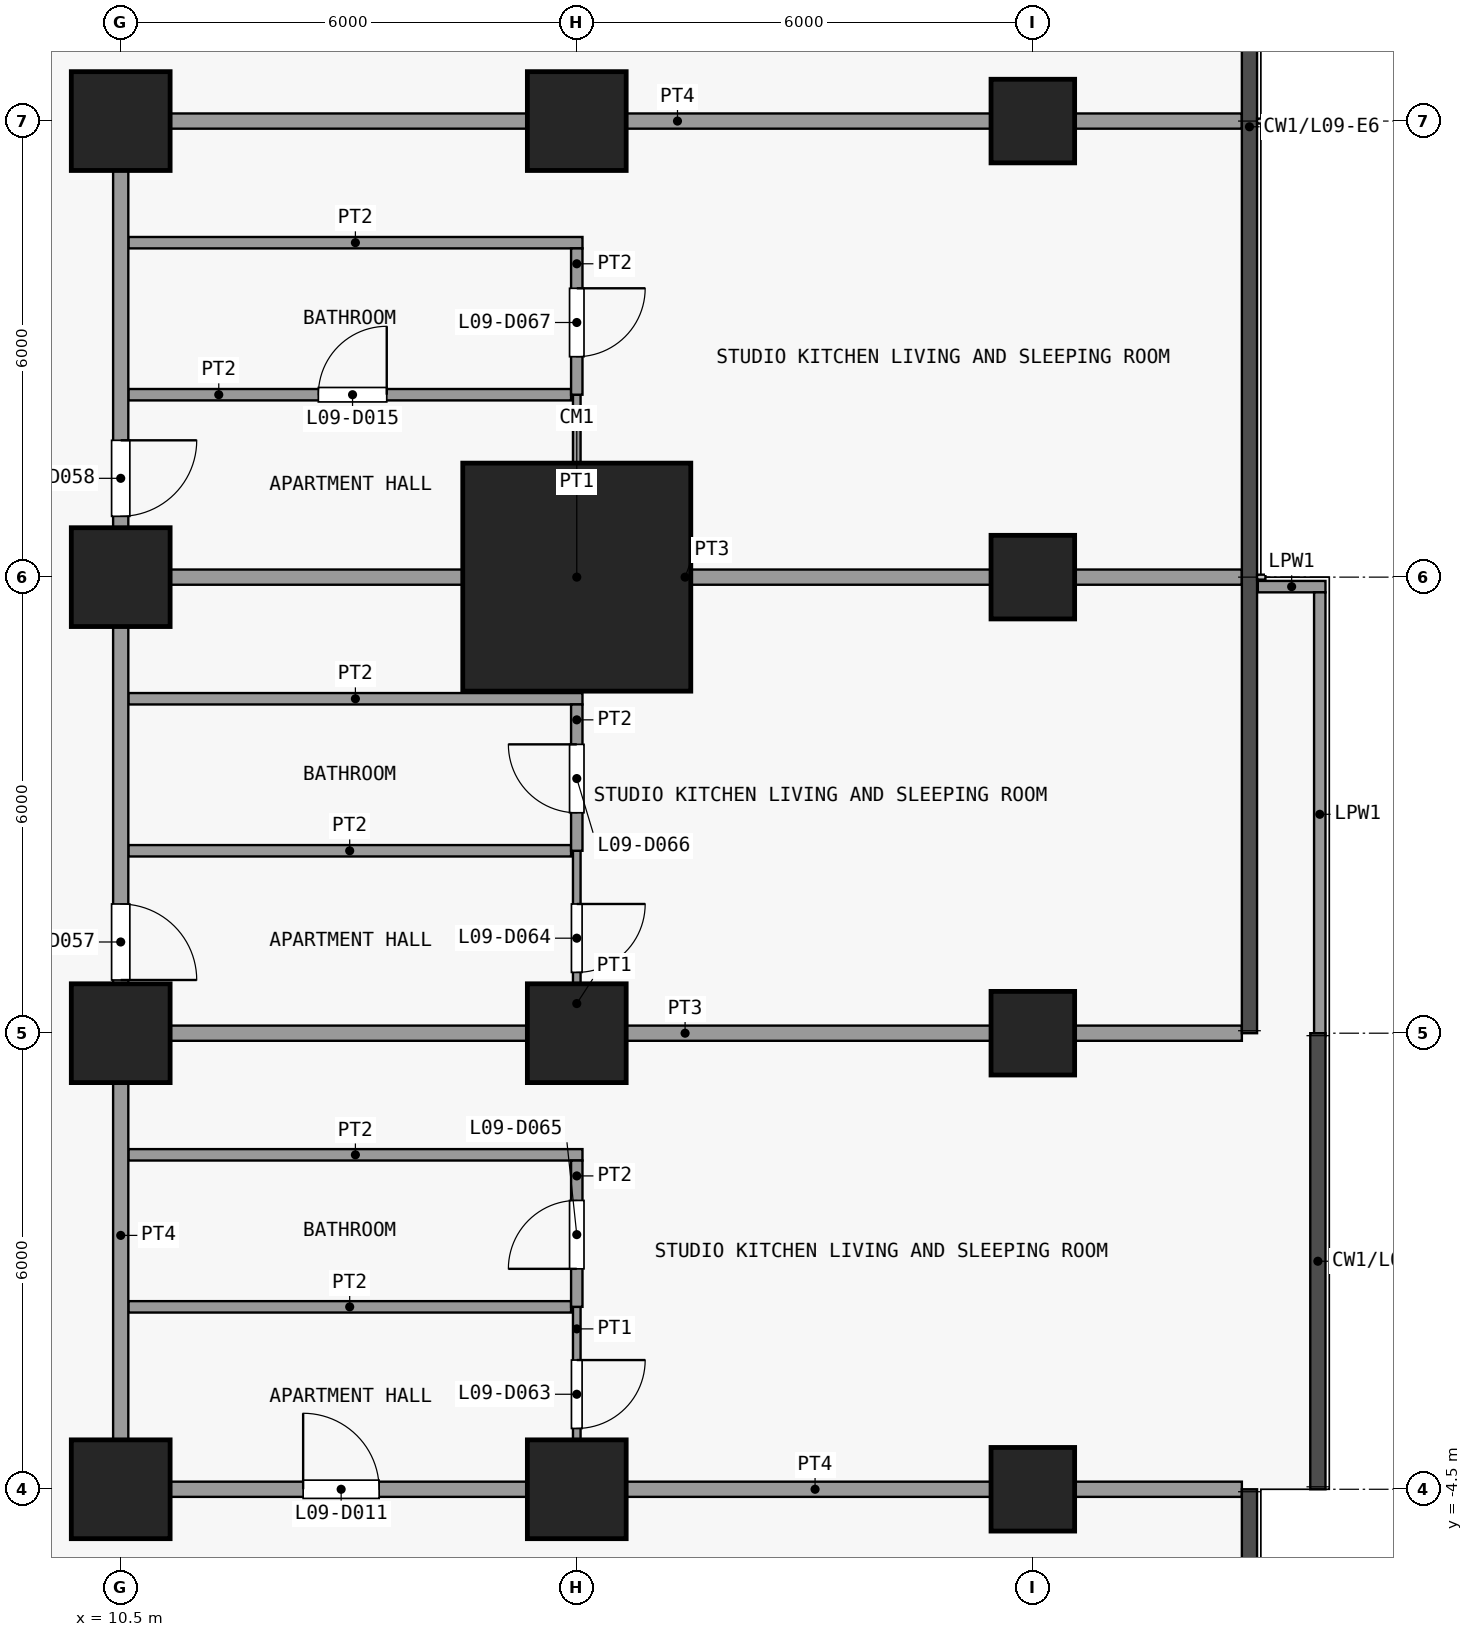
"""IFC4 building model, lengths in metres.
Left out: names, types, materials, properties, quantities, classifications, styles, units other than length and angle.
Written with IfcOpenShell. Run it as: python <this file> out.ifc"""

import sys

from ifc_helpers import new_model, si_unit, direction, frame, frame_2d, origin, origin_2d, place, context, subcontext, project, spatial, rectangle, extrude, element, fill, save


model = new_model("IFC4")
c1 = context("Model", 3, precision=1e-05, world=origin(), true_north=direction((0.0, 1.0)))
c2 = subcontext(c1, "Body", "Model", "MODEL_VIEW")
j1 = project(units=[si_unit("LENGTHUNIT", "METRE"), si_unit("PLANEANGLEUNIT", "RADIAN")], contexts=[c1])
p1 = place(None, origin())
s1 = spatial("IfcSite", under=j1, at=p1, CompositionType="ELEMENT")
p2 = place(p1, origin())
s2 = spatial("IfcBuilding", under=s1, at=p2, CompositionType="ELEMENT")
p3 = place(p2, frame((0.0, 0.0, 43.3)))
s3 = spatial("IfcBuildingStorey", under=s2, at=p3, CompositionType="ELEMENT", Elevation=43.3)
for number, where, z_axis, x_axis in (
    (1, (10.5, -4.5, 0.0), (0.0, 0.0, 1.0), (1.0, 0.0, 0.0)),
    (2, (10.5, 1.5, 0.0), (0.0, 0.0, 1.0), (1.0, 0.0, 0.0)),
    (3, (10.5, 7.5, 0.0), (0.0, 0.0, 1.0), (1.0, 0.0, 0.0)),
    (4, (10.5, 13.5, 0.0), (0.0, 0.0, 1.0), (1.0, 0.0, 0.0)),
    (5, (16.5, -4.5, 0.0), (0.0, 0.0, 1.0), (1.0, 0.0, 0.0)),
    (6, (16.5, 1.5, 0.0), (0.0, 0.0, 1.0), (1.0, 0.0, 0.0)),
):
    element("IfcColumn", number, at=place(p3, frame(where, z_axis=z_axis, x_axis=x_axis)), inside=s3, PredefinedType="COLUMN", context=c2, shape_type="SweptSolid", body=[
        extrude(rectangle(XDim=1.3, YDim=1.3, at=origin_2d()), origin(), (0.0, 0.0, 1.0), 3.6),
    ])
p4 = place(p3, frame((16.5, 7.5, 0.0), z_axis=(0.0, 0.0, 1.0), x_axis=(1.0, 0.0, 0.0)))
e7 = element("IfcColumn", 7, at=p4, inside=s3, PredefinedType="COLUMN", context=c2, shape_type="SweptSolid", body=[
    extrude(rectangle(XDim=3.0, YDim=3.0, at=origin_2d()), origin(), (0.0, 0.0, 1.0), 3.6),
])
p5 = place(p3, frame((16.5, 13.5, 0.0), z_axis=(0.0, 0.0, 1.0), x_axis=(1.0, 0.0, 0.0)))
e8 = element("IfcColumn", 8, at=p5, inside=s3, PredefinedType="COLUMN", context=c2, shape_type="SweptSolid", body=[
    extrude(rectangle(XDim=1.3, YDim=1.3, at=origin_2d()), origin(), (0.0, 0.0, 1.0), 3.6),
])
for number, where, z_axis, x_axis in (
    (9, (22.5, -4.5, 0.0), (0.0, 0.0, 1.0), (1.0, 0.0, 0.0)),
    (10, (22.5, 1.5, 0.0), (0.0, 0.0, 1.0), (1.0, 0.0, 0.0)),
    (11, (22.5, 7.5, 0.0), (0.0, 0.0, 1.0), (1.0, 0.0, 0.0)),
    (12, (22.5, 13.5, 0.0), (0.0, 0.0, 1.0), (1.0, 0.0, 0.0)),
):
    element("IfcColumn", number, at=place(p3, frame(where, z_axis=z_axis, x_axis=x_axis)), inside=s3, PredefinedType="COLUMN", context=c2, shape_type="SweptSolid", body=[
        extrude(rectangle(XDim=1.1, YDim=1.1, at=origin_2d()), origin(), (0.0, 0.0, 1.0), 3.6),
    ])
p6 = place(p3, frame((25.46, 7.375, 0.0), z_axis=(0.0, 0.0, 1.0), x_axis=(1.0, 0.0, 0.0)))
e13 = element("IfcWall", 13, at=p6, inside=s3, PredefinedType="PARAPET", context=c2, shape_type="SweptSolid", body=[
    extrude(rectangle(XDim=0.89, YDim=0.15, at=frame_2d((0.445, 0.0))), origin(), (0.0, 0.0, 1.0), 1.15),
])
p7 = place(p3, frame((26.275, 7.3, 0.0), z_axis=(0.0, 0.0, 1.0), x_axis=(0.0, -1.0, 0.0)))
e14 = element("IfcWall", 14, at=p7, inside=s3, PredefinedType="PARAPET", context=c2, shape_type="SweptSolid", body=[
    extrude(rectangle(XDim=5.84, YDim=0.15, at=frame_2d((2.92, 0.0))), origin(), (0.0, 0.0, 1.0), 1.15),
])
p8 = place(p3, frame((10.4, -4.5, 0.0), z_axis=(0.0, 0.0, 1.0), x_axis=(1.0, 0.0, 0.0)))
e15 = element("IfcWall", 15, at=p8, inside=s3, PredefinedType="PARTITIONING", context=c2, shape_type="SweptSolid", body=[
    extrude(rectangle(XDim=14.85, YDim=0.2, at=frame_2d((7.425, 0.0))), origin(), (0.0, 0.0, 1.0), 3.3),
])
p9 = place(p8, frame((2.5, 0.0, 0.0)))
e16 = element("IfcOpeningElement", 16, at=p9, cuts=e15, PredefinedType="OPENING", context=c2, shape_type="SweptSolid", body=[
    extrude(rectangle(XDim=1.0, YDim=2.1, at=frame_2d((0.5, 1.05))), frame((0.0, 0.11, 0.0), z_axis=(0.0, -1.0, 0.0), x_axis=(1.0, 0.0, 0.0)), (0.0, 0.0, 1.0), 0.22),
])
p10 = place(p3, frame((10.6, -2.1, 0.0), z_axis=(0.0, 0.0, 1.0), x_axis=(1.0, 0.0, 0.0)))
e17 = element("IfcWall", 17, at=p10, inside=s3, PredefinedType="PARTITIONING", context=c2, shape_type="SweptSolid", body=[
    extrude(rectangle(XDim=5.825, YDim=0.15, at=frame_2d((2.913, 0.0))), origin(), (0.0, 0.0, 1.0), 3.3),
])
p11 = place(p3, frame((10.6, -0.1, 0.0), z_axis=(0.0, 0.0, 1.0), x_axis=(1.0, 0.0, 0.0)))
e18 = element("IfcWall", 18, at=p11, inside=s3, PredefinedType="PARTITIONING", context=c2, shape_type="SweptSolid", body=[
    extrude(rectangle(XDim=5.975, YDim=0.15, at=frame_2d((2.987, 0.0))), origin(), (0.0, 0.0, 1.0), 3.3),
])
p12 = place(p3, frame((10.6, 1.5, 0.0), z_axis=(0.0, 0.0, 1.0), x_axis=(1.0, 0.0, 0.0)))
e19 = element("IfcWall", 19, at=p12, inside=s3, PredefinedType="PARTITIONING", context=c2, shape_type="SweptSolid", body=[
    extrude(rectangle(XDim=14.65, YDim=0.2, at=frame_2d((7.325, 0.0))), origin(), (0.0, 0.0, 1.0), 3.3),
])
p13 = place(p3, frame((10.6, 3.9, 0.0), z_axis=(0.0, 0.0, 1.0), x_axis=(1.0, 0.0, 0.0)))
e20 = element("IfcWall", 20, at=p13, inside=s3, PredefinedType="PARTITIONING", context=c2, shape_type="SweptSolid", body=[
    extrude(rectangle(XDim=5.825, YDim=0.15, at=frame_2d((2.913, 0.0))), origin(), (0.0, 0.0, 1.0), 3.3),
])
p14 = place(p3, frame((10.6, 5.9, 0.0), z_axis=(0.0, 0.0, 1.0), x_axis=(1.0, 0.0, 0.0)))
e21 = element("IfcWall", 21, at=p14, inside=s3, PredefinedType="PARTITIONING", context=c2, shape_type="SweptSolid", body=[
    extrude(rectangle(XDim=5.975, YDim=0.15, at=frame_2d((2.987, 0.0))), origin(), (0.0, 0.0, 1.0), 3.3),
])
p15 = place(p3, frame((10.6, 7.5, 0.0), z_axis=(0.0, 0.0, 1.0), x_axis=(1.0, 0.0, 0.0)))
e22 = element("IfcWall", 22, at=p15, inside=s3, PredefinedType="PARTITIONING", context=c2, shape_type="SweptSolid", body=[
    extrude(rectangle(XDim=14.65, YDim=0.2, at=frame_2d((7.325, 0.0))), origin(), (0.0, 0.0, 1.0), 3.3),
])
p16 = place(p3, frame((10.6, 9.9, 0.0), z_axis=(0.0, 0.0, 1.0), x_axis=(1.0, 0.0, 0.0)))
e23 = element("IfcWall", 23, at=p16, inside=s3, PredefinedType="PARTITIONING", context=c2, shape_type="SweptSolid", body=[
    extrude(rectangle(XDim=5.825, YDim=0.15, at=frame_2d((2.913, 0.0))), origin(), (0.0, 0.0, 1.0), 3.3),
])
p17 = place(p16, frame((2.5, 0.0, 0.0)))
e24 = element("IfcOpeningElement", 24, at=p17, cuts=e23, PredefinedType="OPENING", context=c2, shape_type="SweptSolid", body=[
    extrude(rectangle(XDim=0.9, YDim=2.1, at=frame_2d((0.45, 1.05))), frame((0.0, 0.085, 0.0), z_axis=(0.0, -1.0, 0.0), x_axis=(1.0, 0.0, 0.0)), (0.0, 0.0, 1.0), 0.17),
])
p18 = place(p3, frame((10.6, 11.9, 0.0), z_axis=(0.0, 0.0, 1.0), x_axis=(1.0, 0.0, 0.0)))
e25 = element("IfcWall", 25, at=p18, inside=s3, PredefinedType="PARTITIONING", context=c2, shape_type="SweptSolid", body=[
    extrude(rectangle(XDim=5.975, YDim=0.15, at=frame_2d((2.987, 0.0))), origin(), (0.0, 0.0, 1.0), 3.3),
])
p19 = place(p3, frame((10.4, 13.5, 0.0), z_axis=(0.0, 0.0, 1.0), x_axis=(1.0, 0.0, 0.0)))
e26 = element("IfcWall", 26, at=p19, inside=s3, PredefinedType="PARTITIONING", context=c2, shape_type="SweptSolid", body=[
    extrude(rectangle(XDim=14.85, YDim=0.2, at=frame_2d((7.425, 0.0))), origin(), (0.0, 0.0, 1.0), 3.3),
])
p20 = place(p3, frame((10.5, -4.4, 0.0), z_axis=(0.0, 0.0, 1.0), x_axis=(0.0, 1.0, 0.0)))
e27 = element("IfcWall", 27, at=p20, inside=s3, PredefinedType="PARTITIONING", context=c2, shape_type="SweptSolid", body=[
    extrude(rectangle(XDim=17.8, YDim=0.2, at=frame_2d((8.9, 0.0))), origin(), (0.0, 0.0, 1.0), 3.3),
])
p21 = place(p20, frame((6.6, 0.0, 0.0)))
e28 = element("IfcOpeningElement", 28, at=p21, cuts=e27, PredefinedType="OPENING", context=c2, shape_type="SweptSolid", body=[
    extrude(rectangle(XDim=1.0, YDim=2.1, at=frame_2d((0.5, 1.05))), frame((0.0, 0.11, 0.0), z_axis=(0.0, -1.0, 0.0), x_axis=(1.0, 0.0, 0.0)), (0.0, 0.0, 1.0), 0.22),
])
p22 = place(p20, frame((12.7, 0.0, 0.0)))
e29 = element("IfcOpeningElement", 29, at=p22, cuts=e27, PredefinedType="OPENING", context=c2, shape_type="SweptSolid", body=[
    extrude(rectangle(XDim=1.0, YDim=2.1, at=frame_2d((0.5, 1.05))), frame((0.0, 0.11, 0.0), z_axis=(0.0, -1.0, 0.0), x_axis=(1.0, 0.0, 0.0)), (0.0, 0.0, 1.0), 0.22),
])
p23 = place(p3, frame((16.5, -4.4, 0.0), z_axis=(0.0, 0.0, 1.0), x_axis=(0.0, 1.0, 0.0)))
e30 = element("IfcWall", 30, at=p23, inside=s3, PredefinedType="PARTITIONING", context=c2, shape_type="SweptSolid", body=[
    extrude(rectangle(XDim=2.3, YDim=0.1, at=frame_2d((1.15, 0.0))), origin(), (0.0, 0.0, 1.0), 3.3),
])
p24 = place(p23, frame((0.7, 0.0, 0.0)))
e31 = element("IfcOpeningElement", 31, at=p24, cuts=e30, PredefinedType="OPENING", context=c2, shape_type="SweptSolid", body=[
    extrude(rectangle(XDim=0.9, YDim=2.1, at=frame_2d((0.45, 1.05))), frame((0.0, 0.06, 0.0), z_axis=(0.0, -1.0, 0.0), x_axis=(1.0, 0.0, 0.0)), (0.0, 0.0, 1.0), 0.12),
])
p25 = place(p3, frame((16.5, 1.6, 0.0), z_axis=(0.0, 0.0, 1.0), x_axis=(0.0, 1.0, 0.0)))
e32 = element("IfcWall", 32, at=p25, inside=s3, PredefinedType="PARTITIONING", context=c2, shape_type="SweptSolid", body=[
    extrude(rectangle(XDim=2.3, YDim=0.1, at=frame_2d((1.15, 0.0))), origin(), (0.0, 0.0, 1.0), 3.3),
])
p26 = place(p25, frame((0.7, 0.0, 0.0)))
e33 = element("IfcOpeningElement", 33, at=p26, cuts=e32, PredefinedType="OPENING", context=c2, shape_type="SweptSolid", body=[
    extrude(rectangle(XDim=0.9, YDim=2.1, at=frame_2d((0.45, 1.05))), frame((0.0, 0.06, 0.0), z_axis=(0.0, -1.0, 0.0), x_axis=(1.0, 0.0, 0.0)), (0.0, 0.0, 1.0), 0.12),
])
p27 = place(p3, frame((16.5, 7.6, 0.0), z_axis=(0.0, 0.0, 1.0), x_axis=(0.0, 1.0, 0.0)))
e34 = element("IfcWall", 34, at=p27, inside=s3, PredefinedType="PARTITIONING", context=c2, shape_type="SweptSolid", body=[
    extrude(rectangle(XDim=2.3, YDim=0.1, at=frame_2d((1.15, 0.0))), origin(), (0.0, 0.0, 1.0), 3.3),
])
p28 = place(p3, frame((16.5, -2.1, 0.0), z_axis=(0.0, 0.0, 1.0), x_axis=(0.0, 1.0, 0.0)))
e35 = element("IfcWall", 35, at=p28, inside=s3, PredefinedType="PARTITIONING", context=c2, shape_type="SweptSolid", body=[
    extrude(rectangle(XDim=1.925, YDim=0.15, at=frame_2d((0.962, 0.0))), origin(), (0.0, 0.0, 1.0), 3.3),
])
p29 = place(p28, frame((0.5, 0.0, 0.0)))
e36 = element("IfcOpeningElement", 36, at=p29, cuts=e35, PredefinedType="OPENING", context=c2, shape_type="SweptSolid", body=[
    extrude(rectangle(XDim=0.9, YDim=2.1, at=frame_2d((0.45, 1.05))), frame((0.0, 0.085, 0.0), z_axis=(0.0, -1.0, 0.0), x_axis=(1.0, 0.0, 0.0)), (0.0, 0.0, 1.0), 0.17),
])
p30 = place(p3, frame((16.5, 3.9, 0.0), z_axis=(0.0, 0.0, 1.0), x_axis=(0.0, 1.0, 0.0)))
e37 = element("IfcWall", 37, at=p30, inside=s3, PredefinedType="PARTITIONING", context=c2, shape_type="SweptSolid", body=[
    extrude(rectangle(XDim=1.925, YDim=0.15, at=frame_2d((0.962, 0.0))), origin(), (0.0, 0.0, 1.0), 3.3),
])
p31 = place(p30, frame((0.5, 0.0, 0.0)))
e38 = element("IfcOpeningElement", 38, at=p31, cuts=e37, PredefinedType="OPENING", context=c2, shape_type="SweptSolid", body=[
    extrude(rectangle(XDim=0.9, YDim=2.1, at=frame_2d((0.45, 1.05))), frame((0.0, 0.085, 0.0), z_axis=(0.0, -1.0, 0.0), x_axis=(1.0, 0.0, 0.0)), (0.0, 0.0, 1.0), 0.17),
])
p32 = place(p3, frame((16.5, 9.9, 0.0), z_axis=(0.0, 0.0, 1.0), x_axis=(0.0, 1.0, 0.0)))
e39 = element("IfcWall", 39, at=p32, inside=s3, PredefinedType="PARTITIONING", context=c2, shape_type="SweptSolid", body=[
    extrude(rectangle(XDim=1.925, YDim=0.15, at=frame_2d((0.962, 0.0))), origin(), (0.0, 0.0, 1.0), 3.3),
])
p33 = place(p32, frame((0.5, 0.0, 0.0)))
e40 = element("IfcOpeningElement", 40, at=p33, cuts=e39, PredefinedType="OPENING", context=c2, shape_type="SweptSolid", body=[
    extrude(rectangle(XDim=0.9, YDim=2.1, at=frame_2d((0.45, 1.05))), frame((0.0, 0.085, 0.0), z_axis=(0.0, -1.0, 0.0), x_axis=(1.0, 0.0, 0.0)), (0.0, 0.0, 1.0), 0.17),
])
p34 = place(p9, origin())
e41 = element("IfcDoor", 41, at=p34, inside=s3, OperationType="SINGLE_SWING_RIGHT", PredefinedType="DOOR", context=c2, shape_type="SweptSolid", body=[
    extrude(rectangle(XDim=1.0, YDim=2.1, at=frame_2d((0.5, 1.05))), frame((0.0, 0.025, 0.0), z_axis=(0.0, -1.0, 0.0), x_axis=(1.0, 0.0, 0.0)), (0.0, 0.0, 1.0), 0.05),
])
fill(e16, e41)
p35 = place(p17, origin())
e42 = element("IfcDoor", 42, at=p35, inside=s3, OperationType="SINGLE_SWING_LEFT", PredefinedType="DOOR", context=c2, shape_type="SweptSolid", body=[
    extrude(rectangle(XDim=0.9, YDim=2.1, at=frame_2d((0.45, 1.05))), frame((0.0, 0.025, 0.0), z_axis=(0.0, -1.0, 0.0), x_axis=(1.0, 0.0, 0.0)), (0.0, 0.0, 1.0), 0.05),
])
fill(e24, e42)
p36 = place(p21, origin())
e43 = element("IfcDoor", 43, at=p36, inside=s3, OperationType="SINGLE_SWING_LEFT", PredefinedType="DOOR", context=c2, shape_type="SweptSolid", body=[
    extrude(rectangle(XDim=1.0, YDim=2.1, at=frame_2d((0.5, 1.05))), frame((0.0, 0.025, 0.0), z_axis=(0.0, -1.0, 0.0), x_axis=(1.0, 0.0, 0.0)), (0.0, 0.0, 1.0), 0.05),
])
fill(e28, e43)
p37 = place(p22, origin())
e44 = element("IfcDoor", 44, at=p37, inside=s3, OperationType="SINGLE_SWING_RIGHT", PredefinedType="DOOR", context=c2, shape_type="SweptSolid", body=[
    extrude(rectangle(XDim=1.0, YDim=2.1, at=frame_2d((0.5, 1.05))), frame((0.0, 0.025, 0.0), z_axis=(0.0, -1.0, 0.0), x_axis=(1.0, 0.0, 0.0)), (0.0, 0.0, 1.0), 0.05),
])
fill(e29, e44)
p38 = place(p24, origin())
e45 = element("IfcDoor", 45, at=p38, inside=s3, OperationType="SINGLE_SWING_RIGHT", PredefinedType="DOOR", context=c2, shape_type="SweptSolid", body=[
    extrude(rectangle(XDim=0.9, YDim=2.1, at=frame_2d((0.45, 1.05))), frame((0.0, 0.025, 0.0), z_axis=(0.0, -1.0, 0.0), x_axis=(1.0, 0.0, 0.0)), (0.0, 0.0, 1.0), 0.05),
])
fill(e31, e45)
p39 = place(p26, origin())
e46 = element("IfcDoor", 46, at=p39, inside=s3, OperationType="SINGLE_SWING_RIGHT", PredefinedType="DOOR", context=c2, shape_type="SweptSolid", body=[
    extrude(rectangle(XDim=0.9, YDim=2.1, at=frame_2d((0.45, 1.05))), frame((0.0, 0.025, 0.0), z_axis=(0.0, -1.0, 0.0), x_axis=(1.0, 0.0, 0.0)), (0.0, 0.0, 1.0), 0.05),
])
fill(e33, e46)
p40 = place(p29, origin())
e47 = element("IfcDoor", 47, at=p40, inside=s3, OperationType="SINGLE_SWING_RIGHT", PredefinedType="DOOR", context=c2, shape_type="SweptSolid", body=[
    extrude(rectangle(XDim=0.9, YDim=2.1, at=frame_2d((0.45, 1.05))), frame((0.0, 0.025, 0.0), z_axis=(0.0, -1.0, 0.0), x_axis=(1.0, 0.0, 0.0)), (0.0, 0.0, 1.0), 0.05),
])
fill(e36, e47)
p41 = place(p31, origin())
e48 = element("IfcDoor", 48, at=p41, inside=s3, OperationType="SINGLE_SWING_LEFT", PredefinedType="DOOR", context=c2, shape_type="SweptSolid", body=[
    extrude(rectangle(XDim=0.9, YDim=2.1, at=frame_2d((0.45, 1.05))), frame((0.0, 0.025, 0.0), z_axis=(0.0, -1.0, 0.0), x_axis=(1.0, 0.0, 0.0)), (0.0, 0.0, 1.0), 0.05),
])
fill(e38, e48)
p42 = place(p33, origin())
e49 = element("IfcDoor", 49, at=p42, inside=s3, OperationType="SINGLE_SWING_RIGHT", PredefinedType="DOOR", context=c2, shape_type="SweptSolid", body=[
    extrude(rectangle(XDim=0.9, YDim=2.1, at=frame_2d((0.45, 1.05))), frame((0.0, 0.025, 0.0), z_axis=(0.0, -1.0, 0.0), x_axis=(1.0, 0.0, 0.0)), (0.0, 0.0, 1.0), 0.05),
])
fill(e40, e49)
save(model, sys.argv[1])
